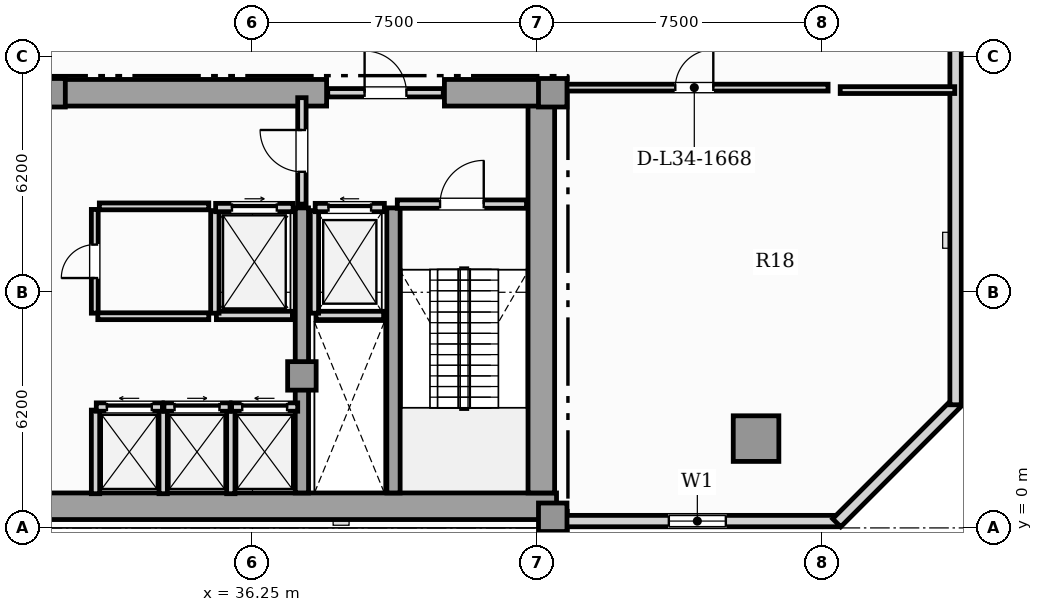
"""IFC4 building model, lengths in metres.
Left out: names, types, materials, properties, quantities, classifications, styles, units other than length and angle.
Written with IfcOpenShell. Run it as: python <this file> out.ifc"""

import sys

from ifc_helpers import new_model, si_unit, direction, frame, frame_2d, origin, origin_2d, place, context, subcontext, project, spatial, rectangle, hollow_rectangle, extrude, element, fill, save


model = new_model("IFC4")
c1 = context("Model", 3, precision=1e-05, world=origin(), true_north=direction((0.0, 1.0)))
c2 = subcontext(c1, "Body", "Model", "MODEL_VIEW")
j1 = project(units=[si_unit("LENGTHUNIT", "METRE"), si_unit("PLANEANGLEUNIT", "RADIAN")], contexts=[c1])
p1 = place(None, origin())
s1 = spatial("IfcSite", under=j1, at=p1, CompositionType="ELEMENT")
p2 = place(p1, origin())
s2 = spatial("IfcBuilding", under=s1, at=p2, CompositionType="ELEMENT")
p3 = place(p2, frame((0.0, 0.0, 140.15)))
s3 = spatial("IfcBuildingStorey", under=s2, at=p3, CompositionType="ELEMENT", Elevation=140.15)
p4 = place(p3, frame((13.25, 0.57, 0.0), z_axis=(0.0, 0.0, 1.0), x_axis=(1.0, 0.0, 0.0)))
e1 = element("IfcWall", 1, at=p4, inside=s3, PredefinedType="SHEAR", context=c2, shape_type="SweptSolid", body=[
    extrude(rectangle(XDim=31.0, YDim=0.7, at=frame_2d((15.5, 0.0))), origin(), (0.0, 0.0, 1.0), 4.83),
])
p5 = place(p3, frame((43.85, 0.92, 0.0), z_axis=(0.0, 0.0, 1.0), x_axis=(0.0, 1.0, 0.0)))
e2 = element("IfcWall", 2, at=p5, inside=s3, PredefinedType="SHEAR", context=c2, shape_type="SweptSolid", body=[
    extrude(rectangle(XDim=10.53, YDim=0.7, at=frame_2d((5.265, 0.0))), origin(), (0.0, 0.0, 1.0), 4.83),
])
p6 = place(p3, frame((30.9, 11.45, 0.0), z_axis=(0.0, 0.0, 1.0), x_axis=(1.0, 0.0, 0.0)))
e3 = element("IfcWall", 3, at=p6, inside=s3, PredefinedType="SHEAR", context=c2, shape_type="SweptSolid", body=[
    extrude(rectangle(XDim=7.3, YDim=0.7, at=frame_2d((3.65, 0.0))), origin(), (0.0, 0.0, 1.0), 4.83),
])
p7 = place(p3, frame((41.3, 11.45, 0.0), z_axis=(0.0, 0.0, 1.0), x_axis=(1.0, 0.0, 0.0)))
e4 = element("IfcWall", 4, at=p7, inside=s3, PredefinedType="SHEAR", context=c2, shape_type="SweptSolid", body=[
    extrude(rectangle(XDim=2.95, YDim=0.7, at=frame_2d((1.475, 0.0))), origin(), (0.0, 0.0, 1.0), 4.83),
])
for number, where, z_axis, x_axis in (
    (5, (37.55, 0.92, 0.0), (0.0, 0.0, 1.0), (0.0, 1.0, 0.0)),
    (6, (39.96, 0.92, 0.0), (0.0, 0.0, 1.0), (0.0, 1.0, 0.0)),
):
    element("IfcWall", number, at=place(p3, frame(where, z_axis=z_axis, x_axis=x_axis)), inside=s3, PredefinedType="SHEAR", context=c2, shape_type="SweptSolid", body=[
        extrude(rectangle(XDim=7.5, YDim=0.35, at=frame_2d((3.75, 0.0))), origin(), (0.0, 0.0, 1.0), 4.83),
    ])
for number, where, z_axis, x_axis in (
    (7, (44.15, 0.28, 0.0), (0.0, 0.0, 1.0), (1.0, 0.0, 0.0)),
    (8, (44.15, 11.45, 0.0), (0.0, 0.0, 1.0), (1.0, 0.0, 0.0)),
    (9, (37.55, 4.0, 0.0), (0.0, 0.0, 1.0), (1.0, 0.0, 0.0)),
    (10, (30.95, 11.45, 0.0), (0.0, 0.0, 1.0), (1.0, 0.0, 0.0)),
):
    element("IfcColumn", number, at=place(p3, frame(where, z_axis=z_axis, x_axis=x_axis)), inside=s3, PredefinedType="COLUMN", context=c2, shape_type="SweptSolid", body=[
        extrude(rectangle(XDim=0.75, YDim=0.75, at=origin_2d()), origin(), (0.0, 0.0, 1.0), 5.05),
    ])
p8 = place(p3, frame((49.5, 2.35, 0.0), z_axis=(0.0, 0.0, 1.0), x_axis=(1.0, 0.0, 0.0)))
e11 = element("IfcColumn", 11, at=p8, inside=s3, PredefinedType="USERDEFINED", context=c2, shape_type="SweptSolid", body=[
    extrude(hollow_rectangle(XDim=1.2, YDim=1.2, WallThickness=0.07, at=origin_2d()), origin(), (0.0, 0.0, 1.0), 5.05),
])
p9 = place(p3, frame((44.25, 0.18, 0.0), z_axis=(0.0, 0.0, 1.0), x_axis=(1.0, 0.0, 0.0)))
e12 = element("IfcWall", 12, at=p9, inside=s3, PredefinedType="SOLIDWALL", context=c2, shape_type="SweptSolid", body=[
    extrude(rectangle(XDim=7.41, YDim=0.3, at=frame_2d((3.705, 0.0))), origin(), (0.0, 0.0, 1.0), 4.83),
])
p10 = place(p9, frame((2.955, 0.0, 0.9)))
e13 = element("IfcOpeningElement", 13, at=p10, cuts=e12, PredefinedType="OPENING", context=c2, shape_type="SweptSolid", body=[
    extrude(rectangle(XDim=1.5, YDim=1.95, at=frame_2d((0.75, 0.975))), frame((0.0, 0.16, 0.0), z_axis=(0.0, -1.0, 0.0), x_axis=(1.0, 0.0, 0.0)), (0.0, 0.0, 1.0), 0.32),
])
p11 = place(p3, frame((51.622, 0.135, 0.0), z_axis=(0.0, 0.0, 1.0), x_axis=(0.707106781187, 0.707106781187, 0.0)))
e14 = element("IfcWall", 14, at=p11, inside=s3, PredefinedType="SOLIDWALL", context=c2, shape_type="SweptSolid", body=[
    extrude(rectangle(XDim=4.445, YDim=0.3, at=frame_2d((2.223, 0.0))), origin(), (0.0, 0.0, 1.0), 4.83),
])
p12 = place(p3, frame((54.75, 3.24, 0.0), z_axis=(0.0, 0.0, 1.0), x_axis=(0.0, 1.0, 0.0)))
e15 = element("IfcWall", 15, at=p12, inside=s3, PredefinedType="SOLIDWALL", context=c2, shape_type="SweptSolid", body=[
    extrude(rectangle(XDim=36.72, YDim=0.3, at=frame_2d((18.36, 0.0))), origin(), (0.0, 0.0, 1.0), 4.83),
])
p13 = place(p12, frame((30.56, 0.0, 0.95)))
e16 = element("IfcOpeningElement", 16, at=p13, cuts=e15, PredefinedType="OPENING", context=c2, shape_type="SweptSolid", body=[
    extrude(rectangle(XDim=0.9, YDim=1.5, at=frame_2d((0.45, 0.75))), frame((0.0, 0.16, 0.0), z_axis=(0.0, -1.0, 0.0), x_axis=(1.0, 0.0, 0.0)), (0.0, 0.0, 1.0), 0.32),
])
p14 = place(p12, frame((10.095, 0.0, 0.95)))
e17 = element("IfcOpeningElement", 17, at=p14, cuts=e15, PredefinedType="OPENING", context=c2, shape_type="SweptSolid", body=[
    extrude(rectangle(XDim=0.9, YDim=1.5, at=frame_2d((0.45, 0.75))), frame((0.0, 0.16, 0.0), z_axis=(0.0, -1.0, 0.0), x_axis=(1.0, 0.0, 0.0)), (0.0, 0.0, 1.0), 0.32),
])
p15 = place(p12, frame((12.757, 0.0, 0.9)))
e18 = element("IfcOpeningElement", 18, at=p15, cuts=e15, PredefinedType="OPENING", context=c2, shape_type="SweptSolid", body=[
    extrude(rectangle(XDim=1.5, YDim=1.95, at=frame_2d((0.75, 0.975))), frame((0.0, 0.16, 0.0), z_axis=(0.0, -1.0, 0.0), x_axis=(1.0, 0.0, 0.0)), (0.0, 0.0, 1.0), 0.32),
])
p16 = place(p12, frame((17.813, 0.0, 0.9)))
e19 = element("IfcOpeningElement", 19, at=p16, cuts=e15, PredefinedType="OPENING", context=c2, shape_type="SweptSolid", body=[
    extrude(rectangle(XDim=1.5, YDim=1.95, at=frame_2d((0.75, 0.975))), frame((0.0, 0.16, 0.0), z_axis=(0.0, -1.0, 0.0), x_axis=(1.0, 0.0, 0.0)), (0.0, 0.0, 1.0), 0.32),
])
p17 = place(p12, frame((25.167, 0.0, 0.9)))
e20 = element("IfcOpeningElement", 20, at=p17, cuts=e15, PredefinedType="OPENING", context=c2, shape_type="SweptSolid", body=[
    extrude(rectangle(XDim=1.5, YDim=1.95, at=frame_2d((0.75, 0.975))), frame((0.0, 0.16, 0.0), z_axis=(0.0, -1.0, 0.0), x_axis=(1.0, 0.0, 0.0)), (0.0, 0.0, 1.0), 0.32),
])
p18 = place(p12, frame((32.834, 0.0, 0.9)))
e21 = element("IfcOpeningElement", 21, at=p18, cuts=e15, PredefinedType="OPENING", context=c2, shape_type="SweptSolid", body=[
    extrude(rectangle(XDim=1.5, YDim=1.95, at=frame_2d((0.75, 0.975))), frame((0.0, 0.16, 0.0), z_axis=(0.0, -1.0, 0.0), x_axis=(1.0, 0.0, 0.0)), (0.0, 0.0, 1.0), 0.32),
])
p19 = place(p3, frame((37.92, 5.59, 0.0), z_axis=(0.0, 0.0, 1.0), x_axis=(1.0, 0.0, 0.0)))
e22 = element("IfcWall", 22, at=p19, inside=s3, PredefinedType="SOLIDWALL", context=c2, shape_type="SweptSolid", body=[
    extrude(rectangle(XDim=1.78, YDim=0.22, at=frame_2d((0.89, 0.0))), origin(), (0.0, 0.0, 1.0), 4.83),
])
p20 = place(p3, frame((37.88, 5.65, 0.0), z_axis=(0.0, 0.0, 1.0), x_axis=(0.0, 1.0, 0.0)))
e23 = element("IfcWall", 23, at=p20, inside=s3, PredefinedType="SOLIDWALL", context=c2, shape_type="SweptSolid", body=[
    extrude(rectangle(XDim=2.7, YDim=0.22, at=frame_2d((1.35, 0.0))), origin(), (0.0, 0.0, 1.0), 4.83),
])
p21 = place(p3, frame((37.9, 8.43, 0.0), z_axis=(0.0, 0.0, 1.0), x_axis=(1.0, 0.0, 0.0)))
e24 = element("IfcWall", 24, at=p21, inside=s3, PredefinedType="SOLIDWALL", context=c2, shape_type="SweptSolid", body=[
    extrude(rectangle(XDim=1.82, YDim=0.22, at=frame_2d((0.91, 0.0))), origin(), (0.0, 0.0, 1.0), 4.83),
])
p22 = place(p21, frame((0.35, 0.0, 0.0)))
e25 = element("IfcOpeningElement", 25, at=p22, cuts=e24, PredefinedType="OPENING", context=c2, shape_type="SweptSolid", body=[
    extrude(rectangle(XDim=1.12, YDim=2.25, at=frame_2d((0.56, 1.125))), frame((0.0, 0.12, 0.0), z_axis=(0.0, -1.0, 0.0), x_axis=(1.0, 0.0, 0.0)), (0.0, 0.0, 1.0), 0.24),
])
p23 = place(p3, frame((35.3, 5.59, 0.0), z_axis=(0.0, 0.0, 1.0), x_axis=(1.0, 0.0, 0.0)))
e26 = element("IfcWall", 26, at=p23, inside=s3, PredefinedType="SOLIDWALL", context=c2, shape_type="SweptSolid", body=[
    extrude(rectangle(XDim=2.0, YDim=0.22, at=frame_2d((1.0, 0.0))), origin(), (0.0, 0.0, 1.0), 4.83),
])
p24 = place(p3, frame((35.26, 5.65, 0.0), z_axis=(0.0, 0.0, 1.0), x_axis=(0.0, 1.0, 0.0)))
e27 = element("IfcWall", 27, at=p24, inside=s3, PredefinedType="SOLIDWALL", context=c2, shape_type="SweptSolid", body=[
    extrude(rectangle(XDim=2.7, YDim=0.22, at=frame_2d((1.35, 0.0))), origin(), (0.0, 0.0, 1.0), 4.83),
])
p25 = place(p3, frame((35.28, 8.43, 0.0), z_axis=(0.0, 0.0, 1.0), x_axis=(1.0, 0.0, 0.0)))
e28 = element("IfcWall", 28, at=p25, inside=s3, PredefinedType="SOLIDWALL", context=c2, shape_type="SweptSolid", body=[
    extrude(rectangle(XDim=2.04, YDim=0.22, at=frame_2d((1.02, 0.0))), origin(), (0.0, 0.0, 1.0), 4.83),
])
p26 = place(p25, frame((0.43, 0.0, 0.0)))
e29 = element("IfcOpeningElement", 29, at=p26, cuts=e28, PredefinedType="OPENING", context=c2, shape_type="SweptSolid", body=[
    extrude(rectangle(XDim=1.18, YDim=2.2, at=frame_2d((0.59, 1.1))), frame((0.0, 0.12, 0.0), z_axis=(0.0, -1.0, 0.0), x_axis=(1.0, 0.0, 0.0)), (0.0, 0.0, 1.0), 0.24),
])
for number, where, z_axis, x_axis in (
    (30, (32.12, 0.9, 0.0), (0.0, 0.0, 1.0), (0.0, 1.0, 0.0)),
    (31, (33.9, 0.9, 0.0), (0.0, 0.0, 1.0), (0.0, 1.0, 0.0)),
):
    element("IfcWall", number, at=place(p3, frame(where, z_axis=z_axis, x_axis=x_axis)), inside=s3, PredefinedType="SOLIDWALL", context=c2, shape_type="SweptSolid", body=[
        extrude(rectangle(XDim=2.2, YDim=0.22, at=frame_2d((1.1, 0.0))), origin(), (0.0, 0.0, 1.0), 4.83),
    ])
p27 = place(p3, frame((32.14, 3.18, 0.0), z_axis=(0.0, 0.0, 1.0), x_axis=(1.0, 0.0, 0.0)))
e32 = element("IfcWall", 32, at=p27, inside=s3, PredefinedType="SOLIDWALL", context=c2, shape_type="SweptSolid", body=[
    extrude(rectangle(XDim=1.74, YDim=0.22, at=frame_2d((0.87, 0.0))), origin(), (0.0, 0.0, 1.0), 4.83),
])
p28 = place(p27, frame((0.28, 0.0, 0.0)))
e33 = element("IfcOpeningElement", 33, at=p28, cuts=e32, PredefinedType="OPENING", context=c2, shape_type="SweptSolid", body=[
    extrude(rectangle(XDim=1.18, YDim=2.2, at=frame_2d((0.59, 1.1))), frame((0.0, 0.12, 0.0), z_axis=(0.0, -1.0, 0.0), x_axis=(1.0, 0.0, 0.0)), (0.0, 0.0, 1.0), 0.24),
])
p29 = place(p3, frame((35.68, 0.9, 0.0), z_axis=(0.0, 0.0, 1.0), x_axis=(0.0, 1.0, 0.0)))
e34 = element("IfcWall", 34, at=p29, inside=s3, PredefinedType="SOLIDWALL", context=c2, shape_type="SweptSolid", body=[
    extrude(rectangle(XDim=2.2, YDim=0.22, at=frame_2d((1.1, 0.0))), origin(), (0.0, 0.0, 1.0), 4.83),
])
p30 = place(p3, frame((33.92, 3.18, 0.0), z_axis=(0.0, 0.0, 1.0), x_axis=(1.0, 0.0, 0.0)))
e35 = element("IfcWall", 35, at=p30, inside=s3, PredefinedType="SOLIDWALL", context=c2, shape_type="SweptSolid", body=[
    extrude(rectangle(XDim=1.74, YDim=0.22, at=frame_2d((0.87, 0.0))), origin(), (0.0, 0.0, 1.0), 4.83),
])
p31 = place(p30, frame((0.28, 0.0, 0.0)))
e36 = element("IfcOpeningElement", 36, at=p31, cuts=e35, PredefinedType="OPENING", context=c2, shape_type="SweptSolid", body=[
    extrude(rectangle(XDim=1.18, YDim=2.2, at=frame_2d((0.59, 1.1))), frame((0.0, 0.12, 0.0), z_axis=(0.0, -1.0, 0.0), x_axis=(1.0, 0.0, 0.0)), (0.0, 0.0, 1.0), 0.24),
])
p32 = place(p3, frame((35.7, 3.18, 0.0), z_axis=(0.0, 0.0, 1.0), x_axis=(1.0, 0.0, 0.0)))
e37 = element("IfcWall", 37, at=p32, inside=s3, PredefinedType="SOLIDWALL", context=c2, shape_type="SweptSolid", body=[
    extrude(rectangle(XDim=1.74, YDim=0.22, at=frame_2d((0.87, 0.0))), origin(), (0.0, 0.0, 1.0), 4.83),
])
p33 = place(p32, frame((0.28, 0.0, 0.0)))
e38 = element("IfcOpeningElement", 38, at=p33, cuts=e37, PredefinedType="OPENING", context=c2, shape_type="SweptSolid", body=[
    extrude(rectangle(XDim=1.18, YDim=2.2, at=frame_2d((0.59, 1.1))), frame((0.0, 0.12, 0.0), z_axis=(0.0, -1.0, 0.0), x_axis=(1.0, 0.0, 0.0)), (0.0, 0.0, 1.0), 0.24),
])
p34 = place(p3, frame((40.06, 8.52, 0.0), z_axis=(0.0, 0.0, 1.0), x_axis=(1.0, 0.0, 0.0)))
e39 = element("IfcWall", 39, at=p34, inside=s3, PredefinedType="SOLIDWALL", context=c2, shape_type="SweptSolid", body=[
    extrude(rectangle(XDim=3.4, YDim=0.22, at=frame_2d((1.7, 0.0))), origin(), (0.0, 0.0, 1.0), 4.83),
])
p35 = place(p34, frame((1.125, 0.0, 0.0)))
e40 = element("IfcOpeningElement", 40, at=p35, cuts=e39, PredefinedType="OPENING", context=c2, shape_type="SweptSolid", body=[
    extrude(rectangle(XDim=1.15, YDim=2.2, at=frame_2d((0.575, 1.1))), frame((0.0, 0.12, 0.0), z_axis=(0.0, -1.0, 0.0), x_axis=(1.0, 0.0, 0.0)), (0.0, 0.0, 1.0), 0.24),
])
p36 = place(p3, frame((37.55, 8.52, 0.0), z_axis=(0.0, 0.0, 1.0), x_axis=(0.0, 1.0, 0.0)))
e41 = element("IfcWall", 41, at=p36, inside=s3, PredefinedType="SOLIDWALL", context=c2, shape_type="SweptSolid", body=[
    extrude(rectangle(XDim=2.8, YDim=0.22, at=frame_2d((1.4, 0.0))), origin(), (0.0, 0.0, 1.0), 4.286),
])
p37 = place(p36, frame((0.85, 0.0, 0.0)))
e42 = element("IfcOpeningElement", 42, at=p37, cuts=e41, PredefinedType="OPENING", context=c2, shape_type="SweptSolid", body=[
    extrude(rectangle(XDim=1.1, YDim=2.2, at=frame_2d((0.55, 1.1))), frame((0.0, 0.12, 0.0), z_axis=(0.0, -1.0, 0.0), x_axis=(1.0, 0.0, 0.0)), (0.0, 0.0, 1.0), 0.24),
])
p38 = place(p3, frame((38.23, 11.45, 0.0), z_axis=(0.0, 0.0, 1.0), x_axis=(1.0, 0.0, 0.0)))
e43 = element("IfcWall", 43, at=p38, inside=s3, PredefinedType="SOLIDWALL", context=c2, shape_type="SweptSolid", body=[
    extrude(rectangle(XDim=3.04, YDim=0.22, at=frame_2d((1.52, 0.0))), origin(), (0.0, 0.0, 1.0), 4.83),
])
p39 = place(p38, frame((0.97, 0.0, 0.0)))
e44 = element("IfcOpeningElement", 44, at=p39, cuts=e43, PredefinedType="OPENING", context=c2, shape_type="SweptSolid", body=[
    extrude(rectangle(XDim=1.1, YDim=2.2, at=frame_2d((0.55, 1.1))), frame((0.0, 0.12, 0.0), z_axis=(0.0, -1.0, 0.0), x_axis=(1.0, 0.0, 0.0)), (0.0, 0.0, 1.0), 0.24),
])
p40 = place(p3, frame((32.1, 5.65, 0.0), z_axis=(0.0, 0.0, 1.0), x_axis=(0.0, 1.0, 0.0)))
e45 = element("IfcWall", 45, at=p40, inside=s3, PredefinedType="PARTITIONING", context=c2, shape_type="SweptSolid", body=[
    extrude(rectangle(XDim=2.73, YDim=0.18, at=frame_2d((1.365, 0.0))), origin(), (0.0, 0.0, 1.0), 4.83),
])
p41 = place(p40, frame((0.925, 0.0, 0.0)))
e46 = element("IfcOpeningElement", 46, at=p41, cuts=e45, PredefinedType="OPENING", context=c2, shape_type="SweptSolid", body=[
    extrude(rectangle(XDim=0.88, YDim=2.05, at=frame_2d((0.44, 1.025))), frame((0.0, 0.1, 0.0), z_axis=(0.0, -1.0, 0.0), x_axis=(1.0, 0.0, 0.0)), (0.0, 0.0, 1.0), 0.2),
])
p42 = place(p3, frame((32.22, 8.46, 0.0), z_axis=(0.0, 0.0, 1.0), x_axis=(1.0, 0.0, 0.0)))
e47 = element("IfcWall", 47, at=p42, inside=s3, PredefinedType="PARTITIONING", context=c2, shape_type="SweptSolid", body=[
    extrude(rectangle(XDim=2.88, YDim=0.18, at=frame_2d((1.44, 0.0))), origin(), (0.0, 0.0, 1.0), 4.83),
])
p43 = place(p3, frame((32.18, 5.57, 0.0), z_axis=(0.0, 0.0, 1.0), x_axis=(1.0, 0.0, 0.0)))
e48 = element("IfcWall", 48, at=p43, inside=s3, PredefinedType="PARTITIONING", context=c2, shape_type="SweptSolid", body=[
    extrude(rectangle(XDim=2.92, YDim=0.18, at=frame_2d((1.46, 0.0))), origin(), (0.0, 0.0, 1.0), 4.83),
])
p44 = place(p3, frame((44.355, 11.585, 0.0), z_axis=(0.0, 0.0, 1.0), x_axis=(1.0, 0.0, 0.0)))
e49 = element("IfcWall", 49, at=p44, inside=s3, PredefinedType="PARTITIONING", context=c2, shape_type="SweptSolid", body=[
    extrude(rectangle(XDim=7.04, YDim=0.18, at=frame_2d((3.52, 0.0))), origin(), (0.0, 0.0, 1.0), 4.83),
])
p45 = place(p44, frame((3.02, 0.0, 0.0)))
e50 = element("IfcOpeningElement", 50, at=p45, cuts=e49, PredefinedType="OPENING", context=c2, shape_type="SweptSolid", body=[
    extrude(rectangle(XDim=1.0, YDim=2.15, at=frame_2d((0.5, 1.075))), frame((0.0, 0.1, 0.0), z_axis=(0.0, -1.0, 0.0), x_axis=(1.0, 0.0, 0.0)), (0.0, 0.0, 1.0), 0.2),
])
p46 = place(p3, frame((51.714, 11.52, 0.0), z_axis=(0.0, 0.0, 1.0), x_axis=(1.0, 0.0, 0.0)))
e51 = element("IfcWall", 51, at=p46, inside=s3, PredefinedType="PARTITIONING", context=c2, shape_type="SweptSolid", body=[
    extrude(rectangle(XDim=3.013, YDim=0.18, at=frame_2d((1.507, 0.0))), origin(), (0.0, 0.0, 1.0), 4.83),
])
p47 = place(p10, origin())
e52 = element("IfcWindow", 52, at=p47, inside=s3, PartitioningType="SINGLE_PANEL", PredefinedType="WINDOW", context=c2, shape_type="SweptSolid", body=[
    extrude(rectangle(XDim=1.5, YDim=1.95, at=frame_2d((0.75, 0.975))), frame((0.0, 0.03, 0.0), z_axis=(0.0, -1.0, 0.0), x_axis=(1.0, 0.0, 0.0)), (0.0, 0.0, 1.0), 0.06),
])
fill(e13, e52)
p48 = place(p22, origin())
e53 = element("IfcDoor", 53, at=p48, inside=s3, OperationType="SLIDING_TO_LEFT", PredefinedType="DOOR", context=c2, shape_type="SweptSolid", body=[
    extrude(rectangle(XDim=1.12, YDim=2.25, at=frame_2d((0.56, 1.125))), frame((0.0, 0.025, 0.0), z_axis=(0.0, -1.0, 0.0), x_axis=(1.0, 0.0, 0.0)), (0.0, 0.0, 1.0), 0.05),
])
fill(e25, e53)
p49 = place(p26, origin())
e54 = element("IfcDoor", 54, at=p49, inside=s3, OperationType="SLIDING_TO_RIGHT", PredefinedType="DOOR", context=c2, shape_type="SweptSolid", body=[
    extrude(rectangle(XDim=1.18, YDim=2.2, at=frame_2d((0.59, 1.1))), frame((0.0, 0.025, 0.0), z_axis=(0.0, -1.0, 0.0), x_axis=(1.0, 0.0, 0.0)), (0.0, 0.0, 1.0), 0.05),
])
fill(e29, e54)
p50 = place(p28, origin())
e55 = element("IfcDoor", 55, at=p50, inside=s3, OperationType="SLIDING_TO_LEFT", PredefinedType="DOOR", context=c2, shape_type="SweptSolid", body=[
    extrude(rectangle(XDim=1.18, YDim=2.2, at=frame_2d((0.59, 1.1))), frame((0.0, 0.025, 0.0), z_axis=(0.0, -1.0, 0.0), x_axis=(1.0, 0.0, 0.0)), (0.0, 0.0, 1.0), 0.05),
])
fill(e33, e55)
p51 = place(p31, origin())
e56 = element("IfcDoor", 56, at=p51, inside=s3, OperationType="SLIDING_TO_RIGHT", PredefinedType="DOOR", context=c2, shape_type="SweptSolid", body=[
    extrude(rectangle(XDim=1.18, YDim=2.2, at=frame_2d((0.59, 1.1))), frame((0.0, 0.025, 0.0), z_axis=(0.0, -1.0, 0.0), x_axis=(1.0, 0.0, 0.0)), (0.0, 0.0, 1.0), 0.05),
])
fill(e36, e56)
p52 = place(p33, origin())
e57 = element("IfcDoor", 57, at=p52, inside=s3, OperationType="SLIDING_TO_LEFT", PredefinedType="DOOR", context=c2, shape_type="SweptSolid", body=[
    extrude(rectangle(XDim=1.18, YDim=2.2, at=frame_2d((0.59, 1.1))), frame((0.0, 0.025, 0.0), z_axis=(0.0, -1.0, 0.0), x_axis=(1.0, 0.0, 0.0)), (0.0, 0.0, 1.0), 0.05),
])
fill(e38, e57)
p53 = place(p35, origin())
e58 = element("IfcDoor", 58, at=p53, inside=s3, OperationType="SINGLE_SWING_RIGHT", PredefinedType="DOOR", context=c2, shape_type="SweptSolid", body=[
    extrude(rectangle(XDim=1.15, YDim=2.2, at=frame_2d((0.575, 1.1))), frame((0.0, 0.025, 0.0), z_axis=(0.0, -1.0, 0.0), x_axis=(1.0, 0.0, 0.0)), (0.0, 0.0, 1.0), 0.05),
])
fill(e40, e58)
p54 = place(p37, origin())
e59 = element("IfcDoor", 59, at=p54, inside=s3, OperationType="SINGLE_SWING_RIGHT", PredefinedType="DOOR", context=c2, shape_type="SweptSolid", body=[
    extrude(rectangle(XDim=1.1, YDim=2.2, at=frame_2d((0.55, 1.1))), frame((0.0, 0.025, 0.0), z_axis=(0.0, -1.0, 0.0), x_axis=(1.0, 0.0, 0.0)), (0.0, 0.0, 1.0), 0.05),
])
fill(e42, e59)
p55 = place(p39, origin())
e60 = element("IfcDoor", 60, at=p55, inside=s3, OperationType="SINGLE_SWING_LEFT", PredefinedType="DOOR", context=c2, shape_type="SweptSolid", body=[
    extrude(rectangle(XDim=1.1, YDim=2.2, at=frame_2d((0.55, 1.1))), frame((0.0, 0.025, 0.0), z_axis=(0.0, -1.0, 0.0), x_axis=(1.0, 0.0, 0.0)), (0.0, 0.0, 1.0), 0.05),
])
fill(e44, e60)
p56 = place(p41, origin())
e61 = element("IfcDoor", 61, at=p56, inside=s3, OperationType="SINGLE_SWING_LEFT", PredefinedType="DOOR", context=c2, shape_type="SweptSolid", body=[
    extrude(rectangle(XDim=0.88, YDim=2.05, at=frame_2d((0.44, 1.025))), frame((0.0, 0.025, 0.0), z_axis=(0.0, -1.0, 0.0), x_axis=(1.0, 0.0, 0.0)), (0.0, 0.0, 1.0), 0.05),
])
fill(e46, e61)
p57 = place(p45, origin())
e62 = element("IfcDoor", 62, at=p57, inside=s3, OperationType="SINGLE_SWING_RIGHT", PredefinedType="DOOR", context=c2, shape_type="SweptSolid", body=[
    extrude(rectangle(XDim=1.0, YDim=2.15, at=frame_2d((0.5, 1.075))), frame((0.0, 0.025, 0.0), z_axis=(0.0, -1.0, 0.0), x_axis=(1.0, 0.0, 0.0)), (0.0, 0.0, 1.0), 0.05),
])
fill(e50, e62)
save(model, sys.argv[1])
